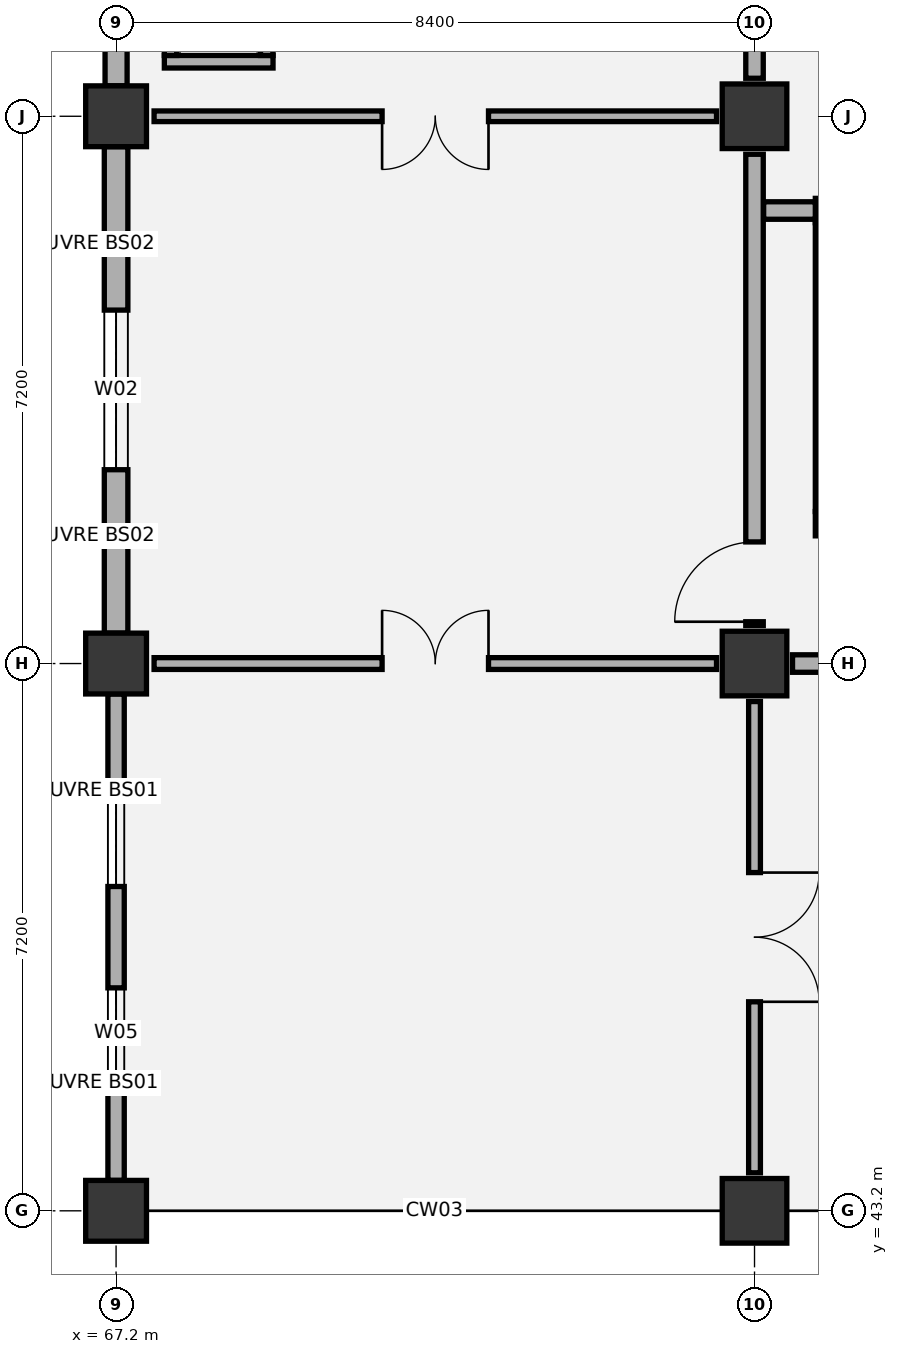
"""IFC4 building model, lengths in metres.
Left out: names, types, materials, properties, quantities, classifications, styles, units other than length and angle.
Written with IfcOpenShell. Run it as: python <this file> out.ifc"""

import sys

from ifc_helpers import new_model, si_unit, direction, frame, frame_2d, origin, origin_2d, place, context, subcontext, project, spatial, rectangle, extrude, element, fill, save


model = new_model("IFC4")
c1 = context("Model", 3, precision=1e-05, world=origin(), true_north=direction((0.0, 1.0)))
c2 = subcontext(c1, "Body", "Model", "MODEL_VIEW")
j1 = project(units=[si_unit("LENGTHUNIT", "METRE"), si_unit("PLANEANGLEUNIT", "RADIAN")], contexts=[c1])
p1 = place(None, origin())
s1 = spatial("IfcSite", under=j1, at=p1, CompositionType="ELEMENT")
p2 = place(p1, origin())
s2 = spatial("IfcBuilding", under=s1, at=p2, CompositionType="ELEMENT")
p3 = place(p2, frame((0.0, 0.0, 22.2)))
s3 = spatial("IfcBuildingStorey", under=s2, at=p3, CompositionType="ELEMENT", Elevation=22.2)
for number, where, z_axis, x_axis in (
    (1, (67.2, 43.2, 0.0), (0.0, 0.0, 1.0), (1.0, 0.0, 0.0)),
    (2, (67.2, 50.4, 0.0), (0.0, 0.0, 1.0), (1.0, 0.0, 0.0)),
    (3, (67.2, 57.6, 0.0), (0.0, 0.0, 1.0), (1.0, 0.0, 0.0)),
):
    element("IfcColumn", number, at=place(p3, frame(where, z_axis=z_axis, x_axis=x_axis)), inside=s3, PredefinedType="COLUMN", context=c2, shape_type="SweptSolid", body=[
        extrude(rectangle(XDim=0.8, YDim=0.8, at=origin_2d()), origin(), (0.0, 0.0, 1.0), 4.8),
    ])
for number, where, z_axis, x_axis in (
    (4, (75.6, 43.2, 0.0), (0.0, 0.0, 1.0), (1.0, 0.0, 0.0)),
    (5, (75.6, 50.4, 0.0), (0.0, 0.0, 1.0), (1.0, 0.0, 0.0)),
    (6, (75.6, 57.6, 0.0), (0.0, 0.0, 1.0), (1.0, 0.0, 0.0)),
):
    element("IfcColumn", number, at=place(p3, frame(where, z_axis=z_axis, x_axis=x_axis)), inside=s3, PredefinedType="COLUMN", context=c2, shape_type="SweptSolid", body=[
        extrude(rectangle(XDim=0.85, YDim=0.85, at=origin_2d()), origin(), (0.0, 0.0, 1.0), 4.8),
    ])
p4 = place(p3, frame((76.4, 52.24, 0.0), z_axis=(0.0, 0.0, 1.0), x_axis=(1.0, 0.0, 0.0)))
e7 = element("IfcWall", 7, at=p4, inside=s3, PredefinedType="SHEAR", context=c2, shape_type="SweptSolid", body=[
    extrude(rectangle(XDim=7.48, YDim=0.32, at=frame_2d((3.74, 0.0))), origin(), (0.0, 0.0, 1.0), 4.52),
])
p5 = place(p4, frame((0.45, 0.0, 0.0)))
e8 = element("IfcOpeningElement", 8, at=p5, cuts=e7, PredefinedType="OPENING", context=c2, shape_type="SweptSolid", body=[
    extrude(rectangle(XDim=1.05, YDim=2.15, at=frame_2d((0.525, 1.075))), frame((0.0, 0.17, 0.0), z_axis=(0.0, -1.0, 0.0), x_axis=(1.0, 0.0, 0.0)), (0.0, 0.0, 1.0), 0.34),
])
p6 = place(p3, frame((76.4, 56.36, 0.0), z_axis=(0.0, 0.0, 1.0), x_axis=(1.0, 0.0, 0.0)))
e9 = element("IfcWall", 9, at=p6, inside=s3, PredefinedType="SHEAR", context=c2, shape_type="SweptSolid", body=[
    extrude(rectangle(XDim=7.48, YDim=0.32, at=frame_2d((3.74, 0.0))), origin(), (0.0, 0.0, 1.0), 4.52),
])
p7 = place(p3, frame((76.56, 52.4, 0.0), z_axis=(0.0, 0.0, 1.0), x_axis=(0.0, 1.0, 0.0)))
e10 = element("IfcWall", 10, at=p7, inside=s3, PredefinedType="SHEAR", context=c2, shape_type="SweptSolid", body=[
    extrude(rectangle(XDim=3.8, YDim=0.32, at=frame_2d((1.9, 0.0))), origin(), (0.0, 0.0, 1.0), 4.52),
])
p8 = place(p3, frame((67.2, 43.6, 0.0), z_axis=(0.0, 0.0, 1.0), x_axis=(0.0, 1.0, 0.0)))
e11 = element("IfcWall", 11, at=p8, inside=s3, PredefinedType="SOLIDWALL", context=c2, shape_type="SweptSolid", body=[
    extrude(rectangle(XDim=6.4, YDim=0.215, at=frame_2d((3.2, 0.0))), origin(), (0.0, 0.0, 1.0), 3.865),
])
p9 = place(p8, frame((1.333, 0.0, 0.9)))
e12 = element("IfcOpeningElement", 12, at=p9, cuts=e11, PredefinedType="OPENING", context=c2, shape_type="SweptSolid", body=[
    extrude(rectangle(XDim=1.2, YDim=1.8, at=frame_2d((0.6, 0.9))), frame((0.0, 0.117, 0.0), z_axis=(0.0, -1.0, 0.0), x_axis=(1.0, 0.0, 0.0)), (0.0, 0.0, 1.0), 0.235),
])
p10 = place(p8, frame((3.867, 0.0, 0.9)))
e13 = element("IfcOpeningElement", 13, at=p10, cuts=e11, PredefinedType="OPENING", context=c2, shape_type="SweptSolid", body=[
    extrude(rectangle(XDim=1.2, YDim=1.8, at=frame_2d((0.6, 0.9))), frame((0.0, 0.117, 0.0), z_axis=(0.0, -1.0, 0.0), x_axis=(1.0, 0.0, 0.0)), (0.0, 0.0, 1.0), 0.235),
])
p11 = place(p3, frame((67.2, 50.8, 0.0), z_axis=(0.0, 0.0, 1.0), x_axis=(0.0, 1.0, 0.0)))
e14 = element("IfcWall", 14, at=p11, inside=s3, PredefinedType="SOLIDWALL", context=c2, shape_type="SweptSolid", body=[
    extrude(rectangle(XDim=6.4, YDim=0.31, at=frame_2d((3.2, 0.0))), origin(), (0.0, 0.0, 1.0), 3.865),
])
p12 = place(p11, frame((2.15, 0.0, 0.9)))
e15 = element("IfcOpeningElement", 15, at=p12, cuts=e14, PredefinedType="OPENING", context=c2, shape_type="SweptSolid", body=[
    extrude(rectangle(XDim=2.1, YDim=1.8, at=frame_2d((1.05, 0.9))), frame((0.0, 0.165, 0.0), z_axis=(0.0, -1.0, 0.0), x_axis=(1.0, 0.0, 0.0)), (0.0, 0.0, 1.0), 0.33),
])
p13 = place(p3, frame((67.2, 58.0, 0.0), z_axis=(0.0, 0.0, 1.0), x_axis=(0.0, 1.0, 0.0)))
e16 = element("IfcWall", 16, at=p13, inside=s3, PredefinedType="SOLIDWALL", context=c2, shape_type="SweptSolid", body=[
    extrude(rectangle(XDim=6.4, YDim=0.29, at=frame_2d((3.2, 0.0))), origin(), (0.0, 0.0, 1.0), 3.865),
])
p14 = place(p13, frame((2.075, 0.0, 0.9)))
e17 = element("IfcOpeningElement", 17, at=p14, cuts=e16, PredefinedType="OPENING", context=c2, shape_type="SweptSolid", body=[
    extrude(rectangle(XDim=2.25, YDim=1.95, at=frame_2d((1.125, 0.975))), frame((0.0, 0.155, 0.0), z_axis=(0.0, -1.0, 0.0), x_axis=(1.0, 0.0, 0.0)), (0.0, 0.0, 1.0), 0.31),
])
p15 = place(p3, frame((67.2, 36.12, -0.35), z_axis=(0.0, 0.0, 1.0), x_axis=(0.0, 1.0, 0.0)))
e18 = element("IfcWall", 18, at=p15, inside=s3, PredefinedType="PARAPET", context=c2, shape_type="SweptSolid", body=[
    extrude(rectangle(XDim=6.96, YDim=0.22, at=frame_2d((3.48, 0.0))), origin(), (0.0, 0.0, 1.0), 1.15),
])
p16 = place(p3, frame((67.835, 58.317, 0.0), z_axis=(0.0, 0.0, 1.0), x_axis=(1.0, 0.0, 0.0)))
e19 = element("IfcWall", 19, at=p16, inside=s3, PredefinedType="PARTITIONING", context=c2, shape_type="SweptSolid", body=[
    extrude(rectangle(XDim=1.43, YDim=0.165, at=frame_2d((0.715, 0.0))), origin(), (0.0, 0.0, 1.0), 4.52),
])
for number, where, z_axis, x_axis in (
    (20, (67.917, 58.4, 0.0), (0.0, 0.0, 1.0), (0.0, 1.0, 0.0)),
    (21, (69.183, 58.4, 0.0), (0.0, 0.0, 1.0), (0.0, 1.0, 0.0)),
):
    element("IfcWall", number, at=place(p3, frame(where, z_axis=z_axis, x_axis=x_axis)), inside=s3, PredefinedType="PARTITIONING", context=c2, shape_type="SweptSolid", body=[
        extrude(rectangle(XDim=0.8, YDim=0.165, at=frame_2d((0.4, 0.0))), origin(), (0.0, 0.0, 1.0), 4.52),
    ])
p17 = place(p3, frame((75.6, 43.7, 0.0), z_axis=(0.0, 0.0, 1.0), x_axis=(0.0, 1.0, 0.0)))
e22 = element("IfcWall", 22, at=p17, inside=s3, PredefinedType="PARTITIONING", context=c2, shape_type="SweptSolid", body=[
    extrude(rectangle(XDim=6.2, YDim=0.155, at=frame_2d((3.1, 0.0))), origin(), (0.0, 0.0, 1.0), 3.865),
])
p18 = place(p17, frame((2.25, 0.0, 0.0)))
e23 = element("IfcOpeningElement", 23, at=p18, cuts=e22, PredefinedType="OPENING", context=c2, shape_type="SweptSolid", body=[
    extrude(rectangle(XDim=1.7, YDim=2.25, at=frame_2d((0.85, 1.125))), frame((0.0, 0.087, 0.0), z_axis=(0.0, -1.0, 0.0), x_axis=(1.0, 0.0, 0.0)), (0.0, 0.0, 1.0), 0.175),
])
p19 = place(p3, frame((67.7, 50.4, 0.0), z_axis=(0.0, 0.0, 1.0), x_axis=(1.0, 0.0, 0.0)))
e24 = element("IfcWall", 24, at=p19, inside=s3, PredefinedType="PARTITIONING", context=c2, shape_type="SweptSolid", body=[
    extrude(rectangle(XDim=7.4, YDim=0.155, at=frame_2d((3.7, 0.0))), origin(), (0.0, 0.0, 1.0), 3.815),
])
p20 = place(p19, frame((3.0, 0.0, 0.0)))
e25 = element("IfcOpeningElement", 25, at=p20, cuts=e24, PredefinedType="OPENING", context=c2, shape_type="SweptSolid", body=[
    extrude(rectangle(XDim=1.4, YDim=2.15, at=frame_2d((0.7, 1.075))), frame((0.0, 0.087, 0.0), z_axis=(0.0, -1.0, 0.0), x_axis=(1.0, 0.0, 0.0)), (0.0, 0.0, 1.0), 0.175),
])
p21 = place(p3, frame((75.6, 50.9, 0.0), z_axis=(0.0, 0.0, 1.0), x_axis=(0.0, 1.0, 0.0)))
e26 = element("IfcWall", 26, at=p21, inside=s3, PredefinedType="PARTITIONING", context=c2, shape_type="SweptSolid", body=[
    extrude(rectangle(XDim=6.2, YDim=0.23, at=frame_2d((3.1, 0.0))), origin(), (0.0, 0.0, 1.0), 4.225),
])
p22 = place(p21, frame((0.05, 0.0, 0.0)))
e27 = element("IfcOpeningElement", 27, at=p22, cuts=e26, PredefinedType="OPENING", context=c2, shape_type="SweptSolid", body=[
    extrude(rectangle(XDim=1.05, YDim=2.15, at=frame_2d((0.525, 1.075))), frame((0.0, 0.125, 0.0), z_axis=(0.0, -1.0, 0.0), x_axis=(1.0, 0.0, 0.0)), (0.0, 0.0, 1.0), 0.25),
])
p23 = place(p3, frame((67.7, 57.6, 0.0), z_axis=(0.0, 0.0, 1.0), x_axis=(1.0, 0.0, 0.0)))
e28 = element("IfcWall", 28, at=p23, inside=s3, PredefinedType="PARTITIONING", context=c2, shape_type="SweptSolid", body=[
    extrude(rectangle(XDim=7.4, YDim=0.14, at=frame_2d((3.7, 0.0))), origin(), (0.0, 0.0, 1.0), 3.815),
])
p24 = place(p23, frame((3.0, 0.0, 0.0)))
e29 = element("IfcOpeningElement", 29, at=p24, cuts=e28, PredefinedType="OPENING", context=c2, shape_type="SweptSolid", body=[
    extrude(rectangle(XDim=1.4, YDim=2.15, at=frame_2d((0.7, 1.075))), frame((0.0, 0.08, 0.0), z_axis=(0.0, -1.0, 0.0), x_axis=(1.0, 0.0, 0.0)), (0.0, 0.0, 1.0), 0.16),
])
p25 = place(p3, frame((75.6, 58.1, 0.0), z_axis=(0.0, 0.0, 1.0), x_axis=(0.0, 1.0, 0.0)))
e30 = element("IfcWall", 30, at=p25, inside=s3, PredefinedType="PARTITIONING", context=c2, shape_type="SweptSolid", body=[
    extrude(rectangle(XDim=6.2, YDim=0.23, at=frame_2d((3.1, 0.0))), origin(), (0.0, 0.0, 1.0), 3.865),
])
p26 = place(p3, frame((76.1, 50.4, 0.0), z_axis=(0.0, 0.0, 1.0), x_axis=(1.0, 0.0, 0.0)))
e31 = element("IfcWall", 31, at=p26, inside=s3, PredefinedType="PARTITIONING", context=c2, shape_type="SweptSolid", body=[
    extrude(rectangle(XDim=7.4, YDim=0.23, at=frame_2d((3.7, 0.0))), origin(), (0.0, 0.0, 1.0), 3.815),
])
p27 = place(p26, frame((2.95, 0.0, 0.0)))
e32 = element("IfcOpeningElement", 32, at=p27, cuts=e31, PredefinedType="OPENING", context=c2, shape_type="SweptSolid", body=[
    extrude(rectangle(XDim=1.5, YDim=2.15, at=frame_2d((0.75, 1.075))), frame((0.0, 0.125, 0.0), z_axis=(0.0, -1.0, 0.0), x_axis=(1.0, 0.0, 0.0)), (0.0, 0.0, 1.0), 0.25),
])
p28 = place(p3, frame((75.72, 56.36, 0.0), z_axis=(0.0, 0.0, 1.0), x_axis=(1.0, 0.0, 0.0)))
e33 = element("IfcWall", 33, at=p28, inside=s3, PredefinedType="PARTITIONING", context=c2, shape_type="SweptSolid", body=[
    extrude(rectangle(XDim=0.68, YDim=0.23, at=frame_2d((0.34, 0.0))), origin(), (0.0, 0.0, 1.0), 4.52),
])
p29 = place(p9, origin())
e34 = element("IfcWindow", 34, at=p29, inside=s3, PartitioningType="SINGLE_PANEL", PredefinedType="WINDOW", context=c2, shape_type="SweptSolid", body=[
    extrude(rectangle(XDim=1.2, YDim=1.8, at=frame_2d((0.6, 0.9))), frame((0.0, 0.03, 0.0), z_axis=(0.0, -1.0, 0.0), x_axis=(1.0, 0.0, 0.0)), (0.0, 0.0, 1.0), 0.06),
])
fill(e12, e34)
p30 = place(p10, origin())
e35 = element("IfcWindow", 35, at=p30, inside=s3, PartitioningType="SINGLE_PANEL", PredefinedType="WINDOW", context=c2, shape_type="SweptSolid", body=[
    extrude(rectangle(XDim=1.2, YDim=1.8, at=frame_2d((0.6, 0.9))), frame((0.0, 0.03, 0.0), z_axis=(0.0, -1.0, 0.0), x_axis=(1.0, 0.0, 0.0)), (0.0, 0.0, 1.0), 0.06),
])
fill(e13, e35)
p31 = place(p12, origin())
e36 = element("IfcWindow", 36, at=p31, inside=s3, PartitioningType="SINGLE_PANEL", PredefinedType="WINDOW", context=c2, shape_type="SweptSolid", body=[
    extrude(rectangle(XDim=2.1, YDim=1.8, at=frame_2d((1.05, 0.9))), frame((0.0, 0.03, 0.0), z_axis=(0.0, -1.0, 0.0), x_axis=(1.0, 0.0, 0.0)), (0.0, 0.0, 1.0), 0.06),
])
fill(e15, e36)
p32 = place(p18, frame((1.7, 0.0, 0.0), z_axis=(0.0, 0.0, 1.0), x_axis=(-1.0, 0.0, 0.0)))
e37 = element("IfcDoor", 37, at=p32, inside=s3, OperationType="DOUBLE_DOOR_SINGLE_SWING", PredefinedType="DOOR", context=c2, shape_type="SweptSolid", body=[
    extrude(rectangle(XDim=1.7, YDim=2.25, at=frame_2d((0.85, 1.125))), frame((0.0, 0.025, 0.0), z_axis=(0.0, -1.0, 0.0), x_axis=(1.0, 0.0, 0.0)), (0.0, 0.0, 1.0), 0.05),
])
fill(e23, e37)
p33 = place(p20, origin())
e38 = element("IfcDoor", 38, at=p33, inside=s3, OperationType="DOUBLE_DOOR_SINGLE_SWING", PredefinedType="DOOR", context=c2, shape_type="SweptSolid", body=[
    extrude(rectangle(XDim=1.4, YDim=2.15, at=frame_2d((0.7, 1.075))), frame((0.0, 0.025, 0.0), z_axis=(0.0, -1.0, 0.0), x_axis=(1.0, 0.0, 0.0)), (0.0, 0.0, 1.0), 0.05),
])
fill(e25, e38)
p34 = place(p22, origin())
e39 = element("IfcDoor", 39, at=p34, inside=s3, OperationType="SINGLE_SWING_LEFT", PredefinedType="DOOR", context=c2, shape_type="SweptSolid", body=[
    extrude(rectangle(XDim=1.05, YDim=2.15, at=frame_2d((0.525, 1.075))), frame((0.0, 0.025, 0.0), z_axis=(0.0, -1.0, 0.0), x_axis=(1.0, 0.0, 0.0)), (0.0, 0.0, 1.0), 0.05),
])
fill(e27, e39)
p35 = place(p24, frame((1.4, 0.0, 0.0), z_axis=(0.0, 0.0, 1.0), x_axis=(-1.0, 0.0, 0.0)))
e40 = element("IfcDoor", 40, at=p35, inside=s3, OperationType="DOUBLE_DOOR_SINGLE_SWING", PredefinedType="DOOR", context=c2, shape_type="SweptSolid", body=[
    extrude(rectangle(XDim=1.4, YDim=2.15, at=frame_2d((0.7, 1.075))), frame((0.0, 0.025, 0.0), z_axis=(0.0, -1.0, 0.0), x_axis=(1.0, 0.0, 0.0)), (0.0, 0.0, 1.0), 0.05),
])
fill(e29, e40)
save(model, sys.argv[1])
